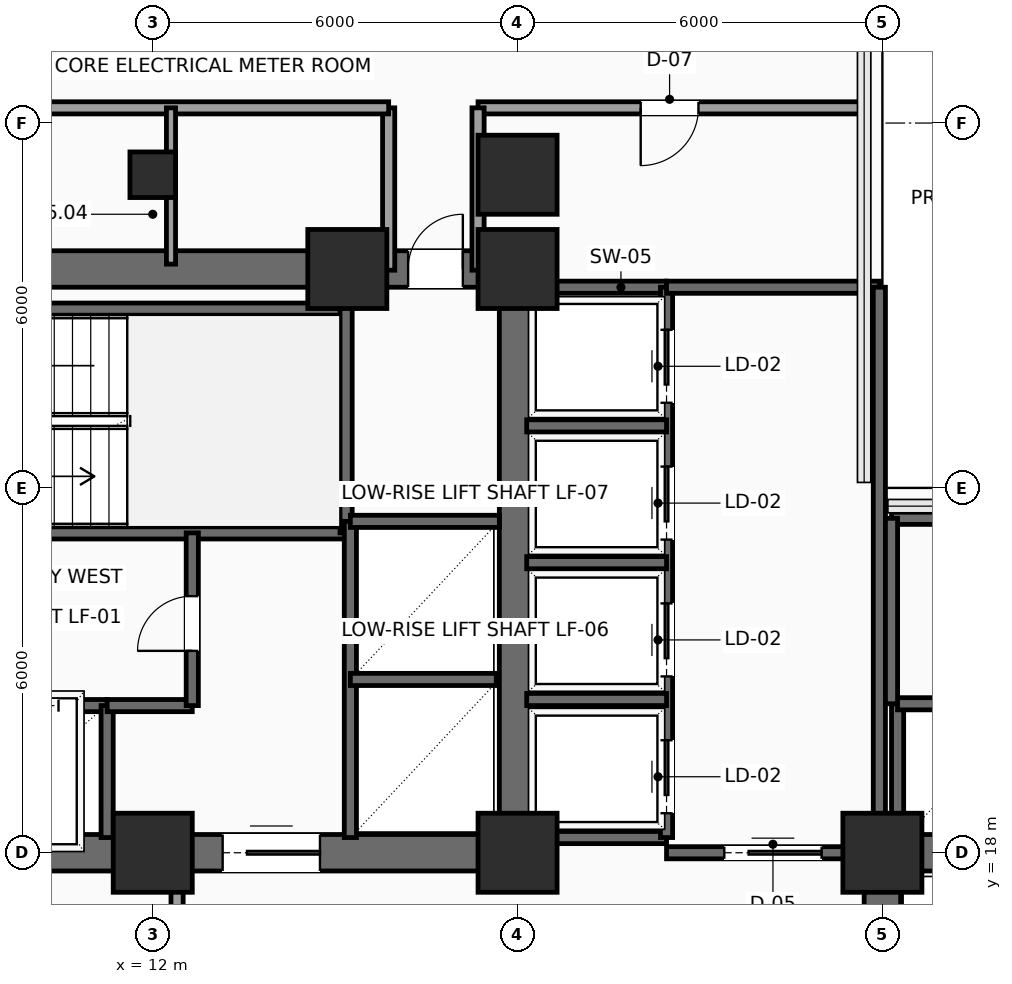
"""IFC4 building model, lengths in metres.
Left out: names, types, materials, properties, quantities, classifications, styles, units other than length and angle.
Written with IfcOpenShell. Run it as: python <this file> out.ifc"""

import sys

from ifc_helpers import new_model, si_unit, direction, frame, frame_2d, origin, origin_2d, place, context, subcontext, project, spatial, rectangle, hollow_rectangle, extrude, element, fill, save


model = new_model("IFC4")
c1 = context("Model", 3, precision=1e-05, world=origin(), true_north=direction((0.0, 1.0)))
c2 = subcontext(c1, "Body", "Model", "MODEL_VIEW")
j1 = project(units=[si_unit("LENGTHUNIT", "METRE"), si_unit("PLANEANGLEUNIT", "RADIAN")], contexts=[c1])
p1 = place(None, origin())
s1 = spatial("IfcSite", under=j1, at=p1, CompositionType="ELEMENT")
p2 = place(p1, origin())
s2 = spatial("IfcBuilding", under=s1, at=p2, CompositionType="ELEMENT")
p3 = place(p2, frame((0.0, 0.0, 59.7)))
s3 = spatial("IfcBuildingStorey", under=s2, at=p3, CompositionType="ELEMENT", Elevation=59.7)
for number, where, z_axis, x_axis in (
    (1, (12.0, 18.0, 0.0), (0.0, 0.0, 1.0), (1.0, 0.0, 0.0)),
    (2, (18.0, 18.0, 0.0), (0.0, 0.0, 1.0), (1.0, 0.0, 0.0)),
    (3, (15.2, 27.6, 0.0), (0.0, 0.0, 1.0), (1.0, 0.0, 0.0)),
    (4, (18.0, 27.6, 0.0), (0.0, 0.0, 1.0), (1.0, 0.0, 0.0)),
    (5, (24.0, 18.0, 0.0), (0.0, 0.0, 1.0), (1.0, 0.0, 0.0)),
):
    element("IfcColumn", number, at=place(p3, frame(where, z_axis=z_axis, x_axis=x_axis)), inside=s3, PredefinedType="COLUMN", context=c2, shape_type="SweptSolid", body=[
        extrude(rectangle(XDim=1.3, YDim=1.3, at=origin_2d()), origin(), (0.0, 0.0, 1.0), 3.9),
    ])
p4 = place(p3, frame((12.0, 29.15, 0.0), z_axis=(0.0, 0.0, 1.0), x_axis=(1.0, 0.0, 0.0)))
e6 = element("IfcColumn", 6, at=p4, inside=s3, PredefinedType="COLUMN", context=c2, shape_type="SweptSolid", body=[
    extrude(hollow_rectangle(XDim=0.75, YDim=0.75, WallThickness=0.035, InnerFilletRadius=0.035, OuterFilletRadius=0.05, at=origin_2d()), origin(), (0.0, 0.0, 1.0), 3.9),
])
p5 = place(p3, frame((18.0, 29.15, 0.0), z_axis=(0.0, 0.0, 1.0), x_axis=(1.0, 0.0, 0.0)))
e7 = element("IfcColumn", 7, at=p5, inside=s3, PredefinedType="COLUMN", context=c2, shape_type="SweptSolid", body=[
    extrude(rectangle(XDim=1.3, YDim=1.3, at=origin_2d()), origin(), (0.0, 0.0, 1.0), 3.9),
])
p6 = place(p3, frame((6.0, 18.0, 0.0), z_axis=(0.0, 0.0, 1.0), x_axis=(1.0, 0.0, 0.0)))
e8 = element("IfcWall", 8, at=p6, inside=s3, PredefinedType="SHEAR", context=c2, shape_type="SweptSolid", body=[
    extrude(rectangle(XDim=12.0, YDim=0.6, at=frame_2d((6.0, 0.0))), origin(), (0.0, 0.0, 1.0), 3.65),
])
p7 = place(p6, frame((7.15, 0.0, 0.0)))
e9 = element("IfcOpeningElement", 9, at=p7, cuts=e8, PredefinedType="OPENING", context=c2, shape_type="SweptSolid", body=[
    extrude(rectangle(XDim=1.6, YDim=2.3, at=frame_2d((0.8, 1.15))), frame((0.0, 0.31, 0.0), z_axis=(0.0, -1.0, 0.0), x_axis=(1.0, 0.0, 0.0)), (0.0, 0.0, 1.0), 0.62),
])
p8 = place(p3, frame((6.0, 27.6, 0.0), z_axis=(0.0, 0.0, 1.0), x_axis=(1.0, 0.0, 0.0)))
e10 = element("IfcWall", 10, at=p8, inside=s3, PredefinedType="SHEAR", context=c2, shape_type="SweptSolid", body=[
    extrude(rectangle(XDim=12.0, YDim=0.6, at=frame_2d((6.0, 0.0))), origin(), (0.0, 0.0, 1.0), 3.65),
])
p9 = place(p8, frame((10.2, 0.0, 0.0)))
e11 = element("IfcOpeningElement", 11, at=p9, cuts=e10, PredefinedType="OPENING", context=c2, shape_type="SweptSolid", body=[
    extrude(rectangle(XDim=0.9, YDim=2.15, at=frame_2d((0.45, 1.075))), frame((0.0, 0.31, 0.0), z_axis=(0.0, -1.0, 0.0), x_axis=(1.0, 0.0, 0.0)), (0.0, 0.0, 1.0), 0.62),
])
for number, where, z_axis, x_axis in (
    (12, (18.0, 18.0, 0.0), (0.0, 0.0, 1.0), (0.0, 1.0, 0.0)),
    (13, (24.0, 18.0, 0.0), (0.0, 0.0, 1.0), (1.0, 0.0, 0.0)),
):
    element("IfcWall", number, at=place(p3, frame(where, z_axis=z_axis, x_axis=x_axis)), inside=s3, PredefinedType="SHEAR", context=c2, shape_type="SweptSolid", body=[
        extrude(rectangle(XDim=9.6, YDim=0.6, at=frame_2d((4.8, 0.0))), origin(), (0.0, 0.0, 1.0), 3.65),
    ])
p10 = place(p3, frame((24.0, 6.0, 0.0), z_axis=(0.0, 0.0, 1.0), x_axis=(0.0, 1.0, 0.0)))
e14 = element("IfcWall", 14, at=p10, inside=s3, PredefinedType="SHEAR", context=c2, shape_type="SweptSolid", body=[
    extrude(rectangle(XDim=12.0, YDim=0.6, at=frame_2d((6.0, 0.0))), origin(), (0.0, 0.0, 1.0), 3.65),
])
p11 = place(p10, frame((7.15, 0.0, 0.0)))
e15 = element("IfcOpeningElement", 15, at=p11, cuts=e14, PredefinedType="OPENING", context=c2, shape_type="SweptSolid", body=[
    extrude(rectangle(XDim=1.6, YDim=2.3, at=frame_2d((0.8, 1.15))), frame((0.0, 0.31, 0.0), z_axis=(0.0, -1.0, 0.0), x_axis=(1.0, 0.0, 0.0)), (0.0, 0.0, 1.0), 0.62),
])
p12 = place(p3, frame((6.3, 23.26, 0.0), z_axis=(0.0, 0.0, 1.0), x_axis=(1.0, 0.0, 0.0)))
e16 = element("IfcWall", 16, at=p12, inside=s3, PredefinedType="SHEAR", context=c2, shape_type="SweptSolid", body=[
    extrude(rectangle(XDim=8.88, YDim=0.2, at=frame_2d((4.44, 0.0))), origin(), (0.0, 0.0, 1.0), 3.65),
])
p13 = place(p12, frame((0.35, 0.0, 0.0)))
e17 = element("IfcOpeningElement", 17, at=p13, cuts=e16, PredefinedType="OPENING", context=c2, shape_type="SweptSolid", body=[
    extrude(rectangle(XDim=1.1, YDim=2.2, at=frame_2d((0.55, 1.1))), frame((0.0, 0.11, 0.0), z_axis=(0.0, -1.0, 0.0), x_axis=(1.0, 0.0, 0.0)), (0.0, 0.0, 1.0), 0.22),
])
p14 = place(p3, frame((6.3, 26.94, 0.0), z_axis=(0.0, 0.0, 1.0), x_axis=(1.0, 0.0, 0.0)))
e18 = element("IfcWall", 18, at=p14, inside=s3, PredefinedType="SHEAR", context=c2, shape_type="SweptSolid", body=[
    extrude(rectangle(XDim=8.88, YDim=0.2, at=frame_2d((4.44, 0.0))), origin(), (0.0, 0.0, 1.0), 3.65),
])
p15 = place(p3, frame((15.18, 23.26, 0.0), z_axis=(0.0, 0.0, 1.0), x_axis=(0.0, 1.0, 0.0)))
e19 = element("IfcWall", 19, at=p15, inside=s3, PredefinedType="SHEAR", context=c2, shape_type="SweptSolid", body=[
    extrude(rectangle(XDim=4.04, YDim=0.2, at=frame_2d((2.02, 0.0))), origin(), (0.0, 0.0, 1.0), 3.65),
])
p16 = place(p3, frame((6.3, 20.42, 0.0), z_axis=(0.0, 0.0, 1.0), x_axis=(1.0, 0.0, 0.0)))
e20 = element("IfcWall", 20, at=p16, inside=s3, PredefinedType="SHEAR", context=c2, shape_type="SweptSolid", body=[
    extrude(rectangle(XDim=4.95, YDim=0.2, at=frame_2d((2.475, 0.0))), origin(), (0.0, 0.0, 1.0), 3.65),
])
p17 = place(p16, frame((0.65, 0.0, 0.0)))
e21 = element("IfcOpeningElement", 21, at=p17, cuts=e20, PredefinedType="OPENING", context=c2, shape_type="SweptSolid", body=[
    extrude(rectangle(XDim=1.1, YDim=2.2, at=frame_2d((0.55, 1.1))), frame((0.0, 0.11, 0.0), z_axis=(0.0, -1.0, 0.0), x_axis=(1.0, 0.0, 0.0)), (0.0, 0.0, 1.0), 0.22),
])
p18 = place(p16, frame((3.05, 0.0, 0.0)))
e22 = element("IfcOpeningElement", 22, at=p18, cuts=e20, PredefinedType="OPENING", context=c2, shape_type="SweptSolid", body=[
    extrude(rectangle(XDim=1.1, YDim=2.2, at=frame_2d((0.55, 1.1))), frame((0.0, 0.11, 0.0), z_axis=(0.0, -1.0, 0.0), x_axis=(1.0, 0.0, 0.0)), (0.0, 0.0, 1.0), 0.22),
])
p19 = place(p3, frame((11.25, 18.25, 0.0), z_axis=(0.0, 0.0, 1.0), x_axis=(0.0, 1.0, 0.0)))
e23 = element("IfcWall", 23, at=p19, inside=s3, PredefinedType="SHEAR", context=c2, shape_type="SweptSolid", body=[
    extrude(rectangle(XDim=2.17, YDim=0.2, at=frame_2d((1.085, 0.0))), origin(), (0.0, 0.0, 1.0), 3.65),
])
p20 = place(p3, frame((11.25, 20.42, 0.0), z_axis=(0.0, 0.0, 1.0), x_axis=(1.0, 0.0, 0.0)))
e24 = element("IfcWall", 24, at=p20, inside=s3, PredefinedType="SHEAR", context=c2, shape_type="SweptSolid", body=[
    extrude(rectangle(XDim=1.4, YDim=0.2, at=frame_2d((0.7, 0.0))), origin(), (0.0, 0.0, 1.0), 3.65),
])
p21 = place(p3, frame((12.65, 20.42, 0.0), z_axis=(0.0, 0.0, 1.0), x_axis=(0.0, 1.0, 0.0)))
e25 = element("IfcWall", 25, at=p21, inside=s3, PredefinedType="SHEAR", context=c2, shape_type="SweptSolid", body=[
    extrude(rectangle(XDim=2.84, YDim=0.2, at=frame_2d((1.42, 0.0))), origin(), (0.0, 0.0, 1.0), 3.65),
])
p22 = place(p21, frame((0.9, 0.0, 0.0)))
e26 = element("IfcOpeningElement", 26, at=p22, cuts=e25, PredefinedType="OPENING", context=c2, shape_type="SweptSolid", body=[
    extrude(rectangle(XDim=0.9, YDim=2.15, at=frame_2d((0.45, 1.075))), frame((0.0, 0.11, 0.0), z_axis=(0.0, -1.0, 0.0), x_axis=(1.0, 0.0, 0.0)), (0.0, 0.0, 1.0), 0.22),
])
p23 = place(p3, frame((15.25, 18.25, 0.0), z_axis=(0.0, 0.0, 1.0), x_axis=(0.0, 1.0, 0.0)))
e27 = element("IfcWall", 27, at=p23, inside=s3, PredefinedType="SHEAR", context=c2, shape_type="SweptSolid", body=[
    extrude(rectangle(XDim=5.2, YDim=0.2, at=frame_2d((2.6, 0.0))), origin(), (0.0, 0.0, 1.0), 3.65),
])
p24 = place(p3, frame((15.25, 20.85, 0.0), z_axis=(0.0, 0.0, 1.0), x_axis=(1.0, 0.0, 0.0)))
e28 = element("IfcWall", 28, at=p24, inside=s3, PredefinedType="SHEAR", context=c2, shape_type="SweptSolid", body=[
    extrude(rectangle(XDim=2.4, YDim=0.2, at=frame_2d((1.2, 0.0))), origin(), (0.0, 0.0, 1.0), 3.65),
])
p25 = place(p3, frame((15.25, 23.45, 0.0), z_axis=(0.0, 0.0, 1.0), x_axis=(1.0, 0.0, 0.0)))
e29 = element("IfcWall", 29, at=p25, inside=s3, PredefinedType="SHEAR", context=c2, shape_type="SweptSolid", body=[
    extrude(rectangle(XDim=2.45, YDim=0.2, at=frame_2d((1.225, 0.0))), origin(), (0.0, 0.0, 1.0), 3.65),
])
for number, where, z_axis, x_axis in (
    (30, (18.1, 27.3, 0.0), (0.0, 0.0, 1.0), (1.0, 0.0, 0.0)),
    (31, (18.1, 18.25, 0.0), (0.0, 0.0, 1.0), (1.0, 0.0, 0.0)),
):
    element("IfcWall", number, at=place(p3, frame(where, z_axis=z_axis, x_axis=x_axis)), inside=s3, PredefinedType="SHEAR", context=c2, shape_type="SweptSolid", body=[
        extrude(rectangle(XDim=2.35, YDim=0.2, at=frame_2d((1.175, 0.0))), origin(), (0.0, 0.0, 1.0), 3.65),
    ])
p26 = place(p3, frame((20.45, 18.25, 0.0), z_axis=(0.0, 0.0, 1.0), x_axis=(0.0, 1.0, 0.0)))
e32 = element("IfcWall", 32, at=p26, inside=s3, PredefinedType="SHEAR", context=c2, shape_type="SweptSolid", body=[
    extrude(rectangle(XDim=9.05, YDim=0.2, at=frame_2d((4.525, 0.0))), origin(), (0.0, 0.0, 1.0), 3.65),
])
p27 = place(p26, frame((0.4, 0.0, 0.0)))
e33 = element("IfcOpeningElement", 33, at=p27, cuts=e32, PredefinedType="OPENING", context=c2, shape_type="SweptSolid", body=[
    extrude(rectangle(XDim=1.2, YDim=2.2, at=frame_2d((0.6, 1.1))), frame((0.0, 0.11, 0.0), z_axis=(0.0, -1.0, 0.0), x_axis=(1.0, 0.0, 0.0)), (0.0, 0.0, 1.0), 0.22),
])
p28 = place(p26, frame((2.65, 0.0, 0.0)))
e34 = element("IfcOpeningElement", 34, at=p28, cuts=e32, PredefinedType="OPENING", context=c2, shape_type="SweptSolid", body=[
    extrude(rectangle(XDim=1.2, YDim=2.2, at=frame_2d((0.6, 1.1))), frame((0.0, 0.11, 0.0), z_axis=(0.0, -1.0, 0.0), x_axis=(1.0, 0.0, 0.0)), (0.0, 0.0, 1.0), 0.22),
])
p29 = place(p26, frame((4.9, 0.0, 0.0)))
e35 = element("IfcOpeningElement", 35, at=p29, cuts=e32, PredefinedType="OPENING", context=c2, shape_type="SweptSolid", body=[
    extrude(rectangle(XDim=1.2, YDim=2.2, at=frame_2d((0.6, 1.1))), frame((0.0, 0.11, 0.0), z_axis=(0.0, -1.0, 0.0), x_axis=(1.0, 0.0, 0.0)), (0.0, 0.0, 1.0), 0.22),
])
p30 = place(p26, frame((7.15, 0.0, 0.0)))
e36 = element("IfcOpeningElement", 36, at=p30, cuts=e32, PredefinedType="OPENING", context=c2, shape_type="SweptSolid", body=[
    extrude(rectangle(XDim=1.2, YDim=2.2, at=frame_2d((0.6, 1.1))), frame((0.0, 0.11, 0.0), z_axis=(0.0, -1.0, 0.0), x_axis=(1.0, 0.0, 0.0)), (0.0, 0.0, 1.0), 0.22),
])
for number, where, z_axis, x_axis in (
    (37, (18.15, 20.52, 0.0), (0.0, 0.0, 1.0), (1.0, 0.0, 0.0)),
    (38, (18.15, 22.77, 0.0), (0.0, 0.0, 1.0), (1.0, 0.0, 0.0)),
    (39, (18.15, 25.02, 0.0), (0.0, 0.0, 1.0), (1.0, 0.0, 0.0)),
):
    element("IfcWall", number, at=place(p3, frame(where, z_axis=z_axis, x_axis=x_axis)), inside=s3, PredefinedType="SHEAR", context=c2, shape_type="SweptSolid", body=[
        extrude(rectangle(XDim=2.3, YDim=0.2, at=frame_2d((1.15, 0.0))), origin(), (0.0, 0.0, 1.0), 3.65),
    ])
p31 = place(p3, frame((20.45, 18.0, 0.0), z_axis=(0.0, 0.0, 1.0), x_axis=(1.0, 0.0, 0.0)))
e40 = element("IfcWall", 40, at=p31, inside=s3, PredefinedType="SHEAR", context=c2, shape_type="SweptSolid", body=[
    extrude(rectangle(XDim=3.5, YDim=0.2, at=frame_2d((1.75, 0.0))), origin(), (0.0, 0.0, 1.0), 3.65),
])
p32 = place(p31, frame((0.95, 0.0, 0.0)))
e41 = element("IfcOpeningElement", 41, at=p32, cuts=e40, PredefinedType="OPENING", context=c2, shape_type="SweptSolid", body=[
    extrude(rectangle(XDim=1.6, YDim=2.3, at=frame_2d((0.8, 1.15))), frame((0.0, 0.11, 0.0), z_axis=(0.0, -1.0, 0.0), x_axis=(1.0, 0.0, 0.0)), (0.0, 0.0, 1.0), 0.22),
])
p33 = place(p3, frame((20.45, 27.3, 0.0), z_axis=(0.0, 0.0, 1.0), x_axis=(1.0, 0.0, 0.0)))
e42 = element("IfcWall", 42, at=p33, inside=s3, PredefinedType="SHEAR", context=c2, shape_type="SweptSolid", body=[
    extrude(rectangle(XDim=3.5, YDim=0.2, at=frame_2d((1.75, 0.0))), origin(), (0.0, 0.0, 1.0), 3.65),
])
p34 = place(p3, frame((23.95, 18.0, 0.0), z_axis=(0.0, 0.0, 1.0), x_axis=(0.0, 1.0, 0.0)))
e43 = element("IfcWall", 43, at=p34, inside=s3, PredefinedType="SHEAR", context=c2, shape_type="SweptSolid", body=[
    extrude(rectangle(XDim=9.3, YDim=0.2, at=frame_2d((4.65, 0.0))), origin(), (0.0, 0.0, 1.0), 3.65),
])
p35 = place(p3, frame((24.25, 18.1, 0.0), z_axis=(0.0, 0.0, 1.0), x_axis=(0.0, 1.0, 0.0)))
e44 = element("IfcWall", 44, at=p35, inside=s3, PredefinedType="SHEAR", context=c2, shape_type="SweptSolid", body=[
    extrude(rectangle(XDim=2.35, YDim=0.2, at=frame_2d((1.175, 0.0))), origin(), (0.0, 0.0, 1.0), 3.65),
])
p36 = place(p3, frame((24.25, 20.45, 0.0), z_axis=(0.0, 0.0, 1.0), x_axis=(1.0, 0.0, 0.0)))
e45 = element("IfcWall", 45, at=p36, inside=s3, PredefinedType="SHEAR", context=c2, shape_type="SweptSolid", body=[
    extrude(rectangle(XDim=9.05, YDim=0.2, at=frame_2d((4.525, 0.0))), origin(), (0.0, 0.0, 1.0), 3.65),
])
p37 = place(p3, frame((24.15, 23.5, 0.0), z_axis=(0.0, 0.0, 1.0), x_axis=(1.0, 0.0, 0.0)))
e46 = element("IfcWall", 46, at=p37, inside=s3, PredefinedType="SHEAR", context=c2, shape_type="SweptSolid", body=[
    extrude(rectangle(XDim=9.15, YDim=0.2, at=frame_2d((4.575, 0.0))), origin(), (0.0, 0.0, 1.0), 3.65),
])
p38 = place(p3, frame((24.15, 20.45, 0.0), z_axis=(0.0, 0.0, 1.0), x_axis=(0.0, 1.0, 0.0)))
e47 = element("IfcWall", 47, at=p38, inside=s3, PredefinedType="SHEAR", context=c2, shape_type="SweptSolid", body=[
    extrude(rectangle(XDim=3.05, YDim=0.2, at=frame_2d((1.525, 0.0))), origin(), (0.0, 0.0, 1.0), 3.65),
])
p39 = place(p3, frame((23.7, 30.25, 0.0), z_axis=(0.0, 0.0, 1.0), x_axis=(-1.0, 0.0, 0.0)))
e48 = element("IfcWall", 48, at=p39, inside=s3, PredefinedType="SOLIDWALL", context=c2, shape_type="SweptSolid", body=[
    extrude(rectangle(XDim=6.35, YDim=0.2, at=frame_2d((3.175, 0.0))), origin(), (0.0, 0.0, 1.0), 3.65),
])
p40 = place(p39, frame((2.725, 0.0, 0.0)))
e49 = element("IfcOpeningElement", 49, at=p40, cuts=e48, PredefinedType="OPENING", context=c2, shape_type="SweptSolid", body=[
    extrude(rectangle(XDim=0.95, YDim=2.15, at=frame_2d((0.475, 1.075))), frame((0.0, 0.11, 0.0), z_axis=(0.0, -1.0, 0.0), x_axis=(1.0, 0.0, 0.0)), (0.0, 0.0, 1.0), 0.22),
])
for number, where, z_axis, x_axis in (
    (50, (17.35, 30.25, 0.0), (0.0, 0.0, 1.0), (0.0, -1.0, 0.0)),
    (51, (15.88, 27.58, 0.0), (0.0, 0.0, 1.0), (0.0, 1.0, 0.0)),
):
    element("IfcWall", number, at=place(p3, frame(where, z_axis=z_axis, x_axis=x_axis)), inside=s3, PredefinedType="SOLIDWALL", context=c2, shape_type="SweptSolid", body=[
        extrude(rectangle(XDim=2.67, YDim=0.2, at=frame_2d((1.335, 0.0))), origin(), (0.0, 0.0, 1.0), 3.65),
    ])
p41 = place(p3, frame((15.88, 30.25, 0.0), z_axis=(0.0, 0.0, 1.0), x_axis=(-1.0, 0.0, 0.0)))
e52 = element("IfcWall", 52, at=p41, inside=s3, PredefinedType="SOLIDWALL", context=c2, shape_type="SweptSolid", body=[
    extrude(rectangle(XDim=10.63, YDim=0.2, at=frame_2d((5.315, 0.0))), origin(), (0.0, 0.0, 1.0), 3.65),
])
p42 = place(p41, frame((6.13, 0.0, 0.0)))
e53 = element("IfcOpeningElement", 53, at=p42, cuts=e52, PredefinedType="OPENING", context=c2, shape_type="SweptSolid", body=[
    extrude(rectangle(XDim=0.9, YDim=2.1, at=frame_2d((0.45, 1.05))), frame((0.0, 0.11, 0.0), z_axis=(0.0, -1.0, 0.0), x_axis=(1.0, 0.0, 0.0)), (0.0, 0.0, 1.0), 0.22),
])
p43 = place(p3, frame((12.4, 16.15, 0.0), z_axis=(0.0, 0.0, 1.0), x_axis=(0.0, 1.0, 0.0)))
e54 = element("IfcWall", 54, at=p43, inside=s3, PredefinedType="SOLIDWALL", context=c2, shape_type="SweptSolid", body=[
    extrude(rectangle(XDim=1.8, YDim=0.2, at=frame_2d((0.9, 0.0))), origin(), (0.0, 0.0, 1.0), 3.65),
])
p44 = place(p3, frame((12.3, 27.68, 0.0), z_axis=(0.0, 0.0, 1.0), x_axis=(0.0, 1.0, 0.0)))
e55 = element("IfcWall", 55, at=p44, inside=s3, PredefinedType="PARTITIONING", context=c2, shape_type="SweptSolid", body=[
    extrude(rectangle(XDim=2.57, YDim=0.15, at=frame_2d((1.285, 0.0))), origin(), (0.0, 0.0, 1.0), 2.992),
])
p45 = place(p7, origin())
e56 = element("IfcDoor", 56, at=p45, inside=s3, OperationType="DOUBLE_DOOR_SLIDING", PredefinedType="DOOR", context=c2, shape_type="SweptSolid", body=[
    extrude(rectangle(XDim=1.6, YDim=2.3, at=frame_2d((0.8, 1.15))), frame((0.0, 0.025, 0.0), z_axis=(0.0, -1.0, 0.0), x_axis=(1.0, 0.0, 0.0)), (0.0, 0.0, 1.0), 0.05),
])
fill(e9, e56)
p46 = place(p9, origin())
e57 = element("IfcDoor", 57, at=p46, inside=s3, OperationType="SINGLE_SWING_RIGHT", PredefinedType="DOOR", context=c2, shape_type="SweptSolid", body=[
    extrude(rectangle(XDim=0.9, YDim=2.15, at=frame_2d((0.45, 1.075))), frame((0.0, 0.025, 0.0), z_axis=(0.0, -1.0, 0.0), x_axis=(1.0, 0.0, 0.0)), (0.0, 0.0, 1.0), 0.05),
])
fill(e11, e57)
p47 = place(p18, origin())
e58 = element("IfcDoor", 58, at=p47, inside=s3, OperationType="SLIDING_TO_LEFT", PredefinedType="DOOR", context=c2, shape_type="SweptSolid", body=[
    extrude(rectangle(XDim=1.1, YDim=2.2, at=frame_2d((0.55, 1.1))), frame((0.0, 0.025, 0.0), z_axis=(0.0, -1.0, 0.0), x_axis=(1.0, 0.0, 0.0)), (0.0, 0.0, 1.0), 0.05),
])
fill(e22, e58)
p48 = place(p22, origin())
e59 = element("IfcDoor", 59, at=p48, inside=s3, OperationType="SINGLE_SWING_LEFT", PredefinedType="DOOR", context=c2, shape_type="SweptSolid", body=[
    extrude(rectangle(XDim=0.9, YDim=2.15, at=frame_2d((0.45, 1.075))), frame((0.0, 0.025, 0.0), z_axis=(0.0, -1.0, 0.0), x_axis=(1.0, 0.0, 0.0)), (0.0, 0.0, 1.0), 0.05),
])
fill(e26, e59)
p49 = place(p27, origin())
e60 = element("IfcDoor", 60, at=p49, inside=s3, OperationType="SLIDING_TO_RIGHT", PredefinedType="DOOR", context=c2, shape_type="SweptSolid", body=[
    extrude(rectangle(XDim=1.2, YDim=2.2, at=frame_2d((0.6, 1.1))), frame((0.0, 0.025, 0.0), z_axis=(0.0, -1.0, 0.0), x_axis=(1.0, 0.0, 0.0)), (0.0, 0.0, 1.0), 0.05),
])
fill(e33, e60)
p50 = place(p28, origin())
e61 = element("IfcDoor", 61, at=p50, inside=s3, OperationType="SLIDING_TO_RIGHT", PredefinedType="DOOR", context=c2, shape_type="SweptSolid", body=[
    extrude(rectangle(XDim=1.2, YDim=2.2, at=frame_2d((0.6, 1.1))), frame((0.0, 0.025, 0.0), z_axis=(0.0, -1.0, 0.0), x_axis=(1.0, 0.0, 0.0)), (0.0, 0.0, 1.0), 0.05),
])
fill(e34, e61)
p51 = place(p29, origin())
e62 = element("IfcDoor", 62, at=p51, inside=s3, OperationType="SLIDING_TO_RIGHT", PredefinedType="DOOR", context=c2, shape_type="SweptSolid", body=[
    extrude(rectangle(XDim=1.2, YDim=2.2, at=frame_2d((0.6, 1.1))), frame((0.0, 0.025, 0.0), z_axis=(0.0, -1.0, 0.0), x_axis=(1.0, 0.0, 0.0)), (0.0, 0.0, 1.0), 0.05),
])
fill(e35, e62)
p52 = place(p30, origin())
e63 = element("IfcDoor", 63, at=p52, inside=s3, OperationType="SLIDING_TO_RIGHT", PredefinedType="DOOR", context=c2, shape_type="SweptSolid", body=[
    extrude(rectangle(XDim=1.2, YDim=2.2, at=frame_2d((0.6, 1.1))), frame((0.0, 0.025, 0.0), z_axis=(0.0, -1.0, 0.0), x_axis=(1.0, 0.0, 0.0)), (0.0, 0.0, 1.0), 0.05),
])
fill(e36, e63)
p53 = place(p32, origin())
e64 = element("IfcDoor", 64, at=p53, inside=s3, OperationType="DOUBLE_DOOR_SLIDING", PredefinedType="DOOR", context=c2, shape_type="SweptSolid", body=[
    extrude(rectangle(XDim=1.6, YDim=2.3, at=frame_2d((0.8, 1.15))), frame((0.0, 0.025, 0.0), z_axis=(0.0, -1.0, 0.0), x_axis=(1.0, 0.0, 0.0)), (0.0, 0.0, 1.0), 0.05),
])
fill(e41, e64)
p54 = place(p40, origin())
e65 = element("IfcDoor", 65, at=p54, inside=s3, OperationType="SINGLE_SWING_RIGHT", PredefinedType="DOOR", context=c2, shape_type="SweptSolid", body=[
    extrude(rectangle(XDim=0.95, YDim=2.15, at=frame_2d((0.475, 1.075))), frame((0.0, 0.025, 0.0), z_axis=(0.0, -1.0, 0.0), x_axis=(1.0, 0.0, 0.0)), (0.0, 0.0, 1.0), 0.05),
])
fill(e49, e65)
save(model, sys.argv[1])
